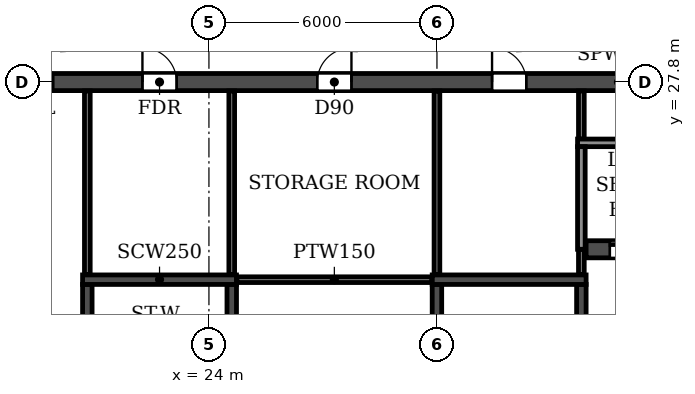
"""IFC4 building model, lengths in metres.
Left out: names, types, materials, properties, quantities, classifications, styles, units other than length and angle.
Written with IfcOpenShell. Run it as: python <this file> out.ifc"""

import sys

from ifc_helpers import new_model, si_unit, direction, frame, frame_2d, origin, place, context, subcontext, project, spatial, rectangle, extrude, element, fill, save


model = new_model("IFC4")
c1 = context("Model", 3, precision=1e-05, world=origin(), true_north=direction((0.0, 1.0)))
c2 = subcontext(c1, "Body", "Model", "MODEL_VIEW")
j1 = project(units=[si_unit("LENGTHUNIT", "METRE"), si_unit("PLANEANGLEUNIT", "RADIAN")], contexts=[c1])
p1 = place(None, origin())
s1 = spatial("IfcSite", under=j1, at=p1, CompositionType="ELEMENT")
p2 = place(p1, origin())
s2 = spatial("IfcBuilding", under=s1, at=p2, CompositionType="ELEMENT")
p3 = place(p2, frame((0.0, 0.0, 158.7)))
s3 = spatial("IfcBuildingStorey", under=s2, at=p3, CompositionType="ELEMENT", Elevation=158.7)
p4 = place(p3, frame((18.2, 27.8, 0.0), z_axis=(0.0, 0.0, 1.0), x_axis=(1.0, 0.0, 0.0)))
e1 = element("IfcWall", 1, at=p4, inside=s3, PredefinedType="SOLIDWALL", context=c2, shape_type="SweptSolid", body=[
    extrude(rectangle(XDim=65.6, YDim=0.45, at=frame_2d((32.8, 0.0))), origin(), (0.0, 0.0, 1.0), 3.07),
])
p5 = place(p4, frame((0.7, 0.0, 0.0)))
e2 = element("IfcOpeningElement", 2, at=p5, cuts=e1, PredefinedType="OPENING", context=c2, shape_type="SweptSolid", body=[
    extrude(rectangle(XDim=1.0, YDim=2.1, at=frame_2d((0.5, 1.05))), frame((0.0, 0.235, 0.0), z_axis=(0.0, -1.0, 0.0), x_axis=(1.0, 0.0, 0.0)), (0.0, 0.0, 1.0), 0.47),
])
p6 = place(p4, frame((4.05, 0.0, 0.0)))
e3 = element("IfcOpeningElement", 3, at=p6, cuts=e1, PredefinedType="OPENING", context=c2, shape_type="SweptSolid", body=[
    extrude(rectangle(XDim=0.9, YDim=2.1, at=frame_2d((0.45, 1.05))), frame((0.0, 0.235, 0.0), z_axis=(0.0, -1.0, 0.0), x_axis=(1.0, 0.0, 0.0)), (0.0, 0.0, 1.0), 0.47),
])
p7 = place(p4, frame((8.65, 0.0, 0.0)))
e4 = element("IfcOpeningElement", 4, at=p7, cuts=e1, PredefinedType="OPENING", context=c2, shape_type="SweptSolid", body=[
    extrude(rectangle(XDim=0.9, YDim=2.1, at=frame_2d((0.45, 1.05))), frame((0.0, 0.235, 0.0), z_axis=(0.0, -1.0, 0.0), x_axis=(1.0, 0.0, 0.0)), (0.0, 0.0, 1.0), 0.47),
])
p8 = place(p4, frame((13.25, 0.0, 0.0)))
e5 = element("IfcOpeningElement", 5, at=p8, cuts=e1, PredefinedType="OPENING", context=c2, shape_type="SweptSolid", body=[
    extrude(rectangle(XDim=0.9, YDim=2.1, at=frame_2d((0.45, 1.05))), frame((0.0, 0.235, 0.0), z_axis=(0.0, -1.0, 0.0), x_axis=(1.0, 0.0, 0.0)), (0.0, 0.0, 1.0), 0.47),
])
p9 = place(p4, frame((19.0, 0.0, 0.0)))
e6 = element("IfcOpeningElement", 6, at=p9, cuts=e1, PredefinedType="OPENING", context=c2, shape_type="SweptSolid", body=[
    extrude(rectangle(XDim=1.0, YDim=2.1, at=frame_2d((0.5, 1.05))), frame((0.0, 0.235, 0.0), z_axis=(0.0, -1.0, 0.0), x_axis=(1.0, 0.0, 0.0)), (0.0, 0.0, 1.0), 0.47),
])
p10 = place(p4, frame((24.2, 0.0, 0.0)))
e7 = element("IfcOpeningElement", 7, at=p10, cuts=e1, PredefinedType="OPENING", context=c2, shape_type="SweptSolid", body=[
    extrude(rectangle(XDim=1.0, YDim=2.1, at=frame_2d((0.5, 1.05))), frame((0.0, 0.235, 0.0), z_axis=(0.0, -1.0, 0.0), x_axis=(1.0, 0.0, 0.0)), (0.0, 0.0, 1.0), 0.47),
])
p11 = place(p4, frame((29.4, 0.0, 0.0)))
e8 = element("IfcOpeningElement", 8, at=p11, cuts=e1, PredefinedType="OPENING", context=c2, shape_type="SweptSolid", body=[
    extrude(rectangle(XDim=1.0, YDim=2.1, at=frame_2d((0.5, 1.05))), frame((0.0, 0.235, 0.0), z_axis=(0.0, -1.0, 0.0), x_axis=(1.0, 0.0, 0.0)), (0.0, 0.0, 1.0), 0.47),
])
p12 = place(p4, frame((32.3, 0.0, 0.0)))
e9 = element("IfcOpeningElement", 9, at=p12, cuts=e1, PredefinedType="OPENING", context=c2, shape_type="SweptSolid", body=[
    extrude(rectangle(XDim=1.0, YDim=2.1, at=frame_2d((0.5, 1.05))), frame((0.0, 0.235, 0.0), z_axis=(0.0, -1.0, 0.0), x_axis=(1.0, 0.0, 0.0)), (0.0, 0.0, 1.0), 0.47),
])
p13 = place(p4, frame((35.2, 0.0, 0.0)))
e10 = element("IfcOpeningElement", 10, at=p13, cuts=e1, PredefinedType="OPENING", context=c2, shape_type="SweptSolid", body=[
    extrude(rectangle(XDim=1.0, YDim=2.1, at=frame_2d((0.5, 1.05))), frame((0.0, 0.235, 0.0), z_axis=(0.0, -1.0, 0.0), x_axis=(1.0, 0.0, 0.0)), (0.0, 0.0, 1.0), 0.47),
])
p14 = place(p4, frame((37.8, 0.0, 0.0)))
e11 = element("IfcOpeningElement", 11, at=p14, cuts=e1, PredefinedType="OPENING", context=c2, shape_type="SweptSolid", body=[
    extrude(rectangle(XDim=1.0, YDim=2.1, at=frame_2d((0.5, 1.05))), frame((0.0, 0.235, 0.0), z_axis=(0.0, -1.0, 0.0), x_axis=(1.0, 0.0, 0.0)), (0.0, 0.0, 1.0), 0.47),
])
p15 = place(p4, frame((40.4, 0.0, 0.0)))
e12 = element("IfcOpeningElement", 12, at=p15, cuts=e1, PredefinedType="OPENING", context=c2, shape_type="SweptSolid", body=[
    extrude(rectangle(XDim=1.0, YDim=2.1, at=frame_2d((0.5, 1.05))), frame((0.0, 0.235, 0.0), z_axis=(0.0, -1.0, 0.0), x_axis=(1.0, 0.0, 0.0)), (0.0, 0.0, 1.0), 0.47),
])
p16 = place(p4, frame((43.0, 0.0, 0.0)))
e13 = element("IfcOpeningElement", 13, at=p16, cuts=e1, PredefinedType="OPENING", context=c2, shape_type="SweptSolid", body=[
    extrude(rectangle(XDim=1.0, YDim=2.1, at=frame_2d((0.5, 1.05))), frame((0.0, 0.235, 0.0), z_axis=(0.0, -1.0, 0.0), x_axis=(1.0, 0.0, 0.0)), (0.0, 0.0, 1.0), 0.47),
])
p17 = place(p4, frame((46.9, 0.0, 0.0)))
e14 = element("IfcOpeningElement", 14, at=p17, cuts=e1, PredefinedType="OPENING", context=c2, shape_type="SweptSolid", body=[
    extrude(rectangle(XDim=1.0, YDim=2.1, at=frame_2d((0.5, 1.05))), frame((0.0, 0.235, 0.0), z_axis=(0.0, -1.0, 0.0), x_axis=(1.0, 0.0, 0.0)), (0.0, 0.0, 1.0), 0.47),
])
p18 = place(p4, frame((51.45, 0.0, 0.0)))
e15 = element("IfcOpeningElement", 15, at=p18, cuts=e1, PredefinedType="OPENING", context=c2, shape_type="SweptSolid", body=[
    extrude(rectangle(XDim=0.9, YDim=2.1, at=frame_2d((0.45, 1.05))), frame((0.0, 0.235, 0.0), z_axis=(0.0, -1.0, 0.0), x_axis=(1.0, 0.0, 0.0)), (0.0, 0.0, 1.0), 0.47),
])
p19 = place(p4, frame((56.05, 0.0, 0.0)))
e16 = element("IfcOpeningElement", 16, at=p19, cuts=e1, PredefinedType="OPENING", context=c2, shape_type="SweptSolid", body=[
    extrude(rectangle(XDim=0.9, YDim=2.1, at=frame_2d((0.45, 1.05))), frame((0.0, 0.235, 0.0), z_axis=(0.0, -1.0, 0.0), x_axis=(1.0, 0.0, 0.0)), (0.0, 0.0, 1.0), 0.47),
])
p20 = place(p4, frame((60.65, 0.0, 0.0)))
e17 = element("IfcOpeningElement", 17, at=p20, cuts=e1, PredefinedType="OPENING", context=c2, shape_type="SweptSolid", body=[
    extrude(rectangle(XDim=0.9, YDim=2.1, at=frame_2d((0.45, 1.05))), frame((0.0, 0.235, 0.0), z_axis=(0.0, -1.0, 0.0), x_axis=(1.0, 0.0, 0.0)), (0.0, 0.0, 1.0), 0.47),
])
p21 = place(p4, frame((63.9, 0.0, 0.0)))
e18 = element("IfcOpeningElement", 18, at=p21, cuts=e1, PredefinedType="OPENING", context=c2, shape_type="SweptSolid", body=[
    extrude(rectangle(XDim=1.0, YDim=2.1, at=frame_2d((0.5, 1.05))), frame((0.0, 0.235, 0.0), z_axis=(0.0, -1.0, 0.0), x_axis=(1.0, 0.0, 0.0)), (0.0, 0.0, 1.0), 0.47),
])
p22 = place(p3, frame((33.925, 23.4, 0.0), z_axis=(0.0, 0.0, 1.0), x_axis=(1.0, 0.0, 0.0)))
e19 = element("IfcWall", 19, at=p22, inside=s3, PredefinedType="SOLIDWALL", context=c2, shape_type="SweptSolid", body=[
    extrude(rectangle(XDim=34.15, YDim=0.45, at=frame_2d((17.075, 0.0))), origin(), (0.0, 0.0, 1.0), 3.07),
])
p23 = place(p22, frame((16.175, 0.0, 0.0)))
e20 = element("IfcOpeningElement", 20, at=p23, cuts=e19, PredefinedType="OPENING", context=c2, shape_type="SweptSolid", body=[
    extrude(rectangle(XDim=1.8, YDim=2.1, at=frame_2d((0.9, 1.05))), frame((0.0, 0.235, 0.0), z_axis=(0.0, -1.0, 0.0), x_axis=(1.0, 0.0, 0.0)), (0.0, 0.0, 1.0), 0.47),
])
p24 = place(p22, frame((0.625, 0.0, 0.0)))
e21 = element("IfcOpeningElement", 21, at=p24, cuts=e19, PredefinedType="OPENING", context=c2, shape_type="SweptSolid", body=[
    extrude(rectangle(XDim=1.1, YDim=2.1, at=frame_2d((0.55, 1.05))), frame((0.0, 0.235, 0.0), z_axis=(0.0, -1.0, 0.0), x_axis=(1.0, 0.0, 0.0)), (0.0, 0.0, 1.0), 0.47),
])
p25 = place(p22, frame((3.225, 0.0, 0.0)))
e22 = element("IfcOpeningElement", 22, at=p25, cuts=e19, PredefinedType="OPENING", context=c2, shape_type="SweptSolid", body=[
    extrude(rectangle(XDim=1.1, YDim=2.1, at=frame_2d((0.55, 1.05))), frame((0.0, 0.235, 0.0), z_axis=(0.0, -1.0, 0.0), x_axis=(1.0, 0.0, 0.0)), (0.0, 0.0, 1.0), 0.47),
])
p26 = place(p22, frame((5.825, 0.0, 0.0)))
e23 = element("IfcOpeningElement", 23, at=p26, cuts=e19, PredefinedType="OPENING", context=c2, shape_type="SweptSolid", body=[
    extrude(rectangle(XDim=1.1, YDim=2.1, at=frame_2d((0.55, 1.05))), frame((0.0, 0.235, 0.0), z_axis=(0.0, -1.0, 0.0), x_axis=(1.0, 0.0, 0.0)), (0.0, 0.0, 1.0), 0.47),
])
p27 = place(p22, frame((8.425, 0.0, 0.0)))
e24 = element("IfcOpeningElement", 24, at=p27, cuts=e19, PredefinedType="OPENING", context=c2, shape_type="SweptSolid", body=[
    extrude(rectangle(XDim=1.1, YDim=2.1, at=frame_2d((0.55, 1.05))), frame((0.0, 0.235, 0.0), z_axis=(0.0, -1.0, 0.0), x_axis=(1.0, 0.0, 0.0)), (0.0, 0.0, 1.0), 0.47),
])
p28 = place(p22, frame((11.025, 0.0, 0.0)))
e25 = element("IfcOpeningElement", 25, at=p28, cuts=e19, PredefinedType="OPENING", context=c2, shape_type="SweptSolid", body=[
    extrude(rectangle(XDim=1.1, YDim=2.1, at=frame_2d((0.55, 1.05))), frame((0.0, 0.235, 0.0), z_axis=(0.0, -1.0, 0.0), x_axis=(1.0, 0.0, 0.0)), (0.0, 0.0, 1.0), 0.47),
])
p29 = place(p22, frame((13.625, 0.0, 0.0)))
e26 = element("IfcOpeningElement", 26, at=p29, cuts=e19, PredefinedType="OPENING", context=c2, shape_type="SweptSolid", body=[
    extrude(rectangle(XDim=1.1, YDim=2.1, at=frame_2d((0.55, 1.05))), frame((0.0, 0.235, 0.0), z_axis=(0.0, -1.0, 0.0), x_axis=(1.0, 0.0, 0.0)), (0.0, 0.0, 1.0), 0.47),
])
p30 = place(p22, frame((27.225, 0.0, 0.0)))
e27 = element("IfcOpeningElement", 27, at=p30, cuts=e19, PredefinedType="OPENING", context=c2, shape_type="SweptSolid", body=[
    extrude(rectangle(XDim=1.1, YDim=2.1, at=frame_2d((0.55, 1.05))), frame((0.0, 0.235, 0.0), z_axis=(0.0, -1.0, 0.0), x_axis=(1.0, 0.0, 0.0)), (0.0, 0.0, 1.0), 0.47),
])
p31 = place(p3, frame((30.0, 14.825, 0.0), z_axis=(0.0, 0.0, 1.0), x_axis=(0.0, 1.0, 0.0)))
e28 = element("IfcWall", 28, at=p31, inside=s3, PredefinedType="SOLIDWALL", context=c2, shape_type="SweptSolid", body=[
    extrude(rectangle(XDim=7.65, YDim=0.25, at=frame_2d((3.825, 0.0))), origin(), (0.0, 0.0, 1.0), 3.07),
])
p32 = place(p3, frame((33.8, 14.825, 0.0), z_axis=(0.0, 0.0, 1.0), x_axis=(0.0, 1.0, 0.0)))
e29 = element("IfcWall", 29, at=p32, inside=s3, PredefinedType="SOLIDWALL", context=c2, shape_type="SweptSolid", body=[
    extrude(rectangle(XDim=7.65, YDim=0.25, at=frame_2d((3.825, 0.0))), origin(), (0.0, 0.0, 1.0), 3.07),
])
p33 = place(p32, frame((0.475, 0.0, 0.0)))
e30 = element("IfcOpeningElement", 30, at=p33, cuts=e29, PredefinedType="OPENING", context=c2, shape_type="SweptSolid", body=[
    extrude(rectangle(XDim=1.0, YDim=2.1, at=frame_2d((0.5, 1.05))), frame((0.0, 0.135, 0.0), z_axis=(0.0, -1.0, 0.0), x_axis=(1.0, 0.0, 0.0)), (0.0, 0.0, 1.0), 0.27),
])
p34 = place(p3, frame((29.875, 22.6, 0.0), z_axis=(0.0, 0.0, 1.0), x_axis=(1.0, 0.0, 0.0)))
e31 = element("IfcWall", 31, at=p34, inside=s3, PredefinedType="SOLIDWALL", context=c2, shape_type="SweptSolid", body=[
    extrude(rectangle(XDim=4.05, YDim=0.25, at=frame_2d((2.025, 0.0))), origin(), (0.0, 0.0, 1.0), 3.07),
])
p35 = place(p3, frame((20.8, 14.825, 0.0), z_axis=(0.0, 0.0, 1.0), x_axis=(0.0, 1.0, 0.0)))
e32 = element("IfcWall", 32, at=p35, inside=s3, PredefinedType="SOLIDWALL", context=c2, shape_type="SweptSolid", body=[
    extrude(rectangle(XDim=7.65, YDim=0.25, at=frame_2d((3.825, 0.0))), origin(), (0.0, 0.0, 1.0), 3.07),
])
p36 = place(p35, frame((0.475, 0.0, 0.0)))
e33 = element("IfcOpeningElement", 33, at=p36, cuts=e32, PredefinedType="OPENING", context=c2, shape_type="SweptSolid", body=[
    extrude(rectangle(XDim=1.0, YDim=2.1, at=frame_2d((0.5, 1.05))), frame((0.0, 0.135, 0.0), z_axis=(0.0, -1.0, 0.0), x_axis=(1.0, 0.0, 0.0)), (0.0, 0.0, 1.0), 0.27),
])
p37 = place(p3, frame((24.6, 14.825, 0.0), z_axis=(0.0, 0.0, 1.0), x_axis=(0.0, 1.0, 0.0)))
e34 = element("IfcWall", 34, at=p37, inside=s3, PredefinedType="SOLIDWALL", context=c2, shape_type="SweptSolid", body=[
    extrude(rectangle(XDim=7.65, YDim=0.25, at=frame_2d((3.825, 0.0))), origin(), (0.0, 0.0, 1.0), 3.07),
])
p38 = place(p3, frame((20.675, 22.6, 0.0), z_axis=(0.0, 0.0, 1.0), x_axis=(1.0, 0.0, 0.0)))
e35 = element("IfcWall", 35, at=p38, inside=s3, PredefinedType="SOLIDWALL", context=c2, shape_type="SweptSolid", body=[
    extrude(rectangle(XDim=4.05, YDim=0.25, at=frame_2d((2.025, 0.0))), origin(), (0.0, 0.0, 1.0), 3.07),
])
p39 = place(p3, frame((24.735, 22.6, 0.0), z_axis=(0.0, 0.0, 1.0), x_axis=(1.0, 0.0, 0.0)))
e36 = element("IfcWall", 36, at=p39, inside=s3, PredefinedType="PARTITIONING", context=c2, shape_type="SweptSolid", body=[
    extrude(rectangle(XDim=5.13, YDim=0.15, at=frame_2d((2.565, 0.0))), origin(), (0.0, 0.0, 1.0), 3.07),
])
for number, where, z_axis, x_axis in (
    (37, (20.8, 22.735, 0.0), (0.0, 0.0, 1.0), (0.0, 1.0, 0.0)),
    (38, (24.6, 22.735, 0.0), (0.0, 0.0, 1.0), (0.0, 1.0, 0.0)),
    (39, (30.0, 22.735, 0.0), (0.0, 0.0, 1.0), (0.0, 1.0, 0.0)),
):
    element("IfcWall", number, at=place(p3, frame(where, z_axis=z_axis, x_axis=x_axis)), inside=s3, PredefinedType="PARTITIONING", context=c2, shape_type="SweptSolid", body=[
        extrude(rectangle(XDim=4.83, YDim=0.15, at=frame_2d((2.415, 0.0))), origin(), (0.0, 0.0, 1.0), 3.07),
    ])
p40 = place(p3, frame((33.8, 22.735, 0.0), z_axis=(0.0, 0.0, 1.0), x_axis=(0.0, 1.0, 0.0)))
e40 = element("IfcWall", 40, at=p40, inside=s3, PredefinedType="PARTITIONING", context=c2, shape_type="SweptSolid", body=[
    extrude(rectangle(XDim=0.665, YDim=0.15, at=frame_2d((0.333, 0.0))), origin(), (0.0, 0.0, 1.0), 3.07),
])
p41 = place(p3, frame((33.8, 26.3, 0.0), z_axis=(0.0, 0.0, 1.0), x_axis=(0.0, 1.0, 0.0)))
e41 = element("IfcWall", 41, at=p41, inside=s3, PredefinedType="PARTITIONING", context=c2, shape_type="SweptSolid", body=[
    extrude(rectangle(XDim=1.265, YDim=0.15, at=frame_2d((0.632, 0.0))), origin(), (0.0, 0.0, 1.0), 3.07),
])
p42 = place(p3, frame((33.7, 26.2, 0.0), z_axis=(0.0, 0.0, 1.0), x_axis=(1.0, 0.0, 0.0)))
e42 = element("IfcWall", 42, at=p42, inside=s3, PredefinedType="PARTITIONING", context=c2, shape_type="SweptSolid", body=[
    extrude(rectangle(XDim=10.4, YDim=0.2, at=frame_2d((5.2, 0.0))), origin(), (0.0, 0.0, 1.0), 3.07),
])
p43 = place(p3, frame((33.8, 23.4, 0.0), z_axis=(0.0, 0.0, 1.0), x_axis=(0.0, 1.0, 0.0)))
e43 = element("IfcWall", 43, at=p43, inside=s3, PredefinedType="PARTITIONING", context=c2, shape_type="SweptSolid", body=[
    extrude(rectangle(XDim=2.7, YDim=0.2, at=frame_2d((1.35, 0.0))), origin(), (0.0, 0.0, 1.0), 3.07),
])
p44 = place(p5, origin())
e44 = element("IfcDoor", 44, at=p44, inside=s3, OperationType="SINGLE_SWING_LEFT", PredefinedType="DOOR", context=c2, shape_type="SweptSolid", body=[
    extrude(rectangle(XDim=1.0, YDim=2.1, at=frame_2d((0.5, 1.05))), frame((0.0, 0.025, 0.0), z_axis=(0.0, -1.0, 0.0), x_axis=(1.0, 0.0, 0.0)), (0.0, 0.0, 1.0), 0.05),
])
fill(e2, e44)
p45 = place(p6, origin())
e45 = element("IfcDoor", 45, at=p45, inside=s3, OperationType="SINGLE_SWING_LEFT", PredefinedType="DOOR", context=c2, shape_type="SweptSolid", body=[
    extrude(rectangle(XDim=0.9, YDim=2.1, at=frame_2d((0.45, 1.05))), frame((0.0, 0.025, 0.0), z_axis=(0.0, -1.0, 0.0), x_axis=(1.0, 0.0, 0.0)), (0.0, 0.0, 1.0), 0.05),
])
fill(e3, e45)
p46 = place(p7, origin())
e46 = element("IfcDoor", 46, at=p46, inside=s3, OperationType="SINGLE_SWING_RIGHT", PredefinedType="DOOR", context=c2, shape_type="SweptSolid", body=[
    extrude(rectangle(XDim=0.9, YDim=2.1, at=frame_2d((0.45, 1.05))), frame((0.0, 0.025, 0.0), z_axis=(0.0, -1.0, 0.0), x_axis=(1.0, 0.0, 0.0)), (0.0, 0.0, 1.0), 0.05),
])
fill(e4, e46)
p47 = place(p8, origin())
e47 = element("IfcDoor", 47, at=p47, inside=s3, OperationType="SINGLE_SWING_LEFT", PredefinedType="DOOR", context=c2, shape_type="SweptSolid", body=[
    extrude(rectangle(XDim=0.9, YDim=2.1, at=frame_2d((0.45, 1.05))), frame((0.0, 0.025, 0.0), z_axis=(0.0, -1.0, 0.0), x_axis=(1.0, 0.0, 0.0)), (0.0, 0.0, 1.0), 0.05),
])
fill(e5, e47)
p48 = place(p24, origin())
e48 = element("IfcDoor", 48, at=p48, inside=s3, OperationType="DOUBLE_DOOR_SLIDING", PredefinedType="DOOR", context=c2, shape_type="SweptSolid", body=[
    extrude(rectangle(XDim=1.1, YDim=2.1, at=frame_2d((0.55, 1.05))), frame((0.0, 0.025, 0.0), z_axis=(0.0, -1.0, 0.0), x_axis=(1.0, 0.0, 0.0)), (0.0, 0.0, 1.0), 0.05),
])
fill(e21, e48)
save(model, sys.argv[1])
